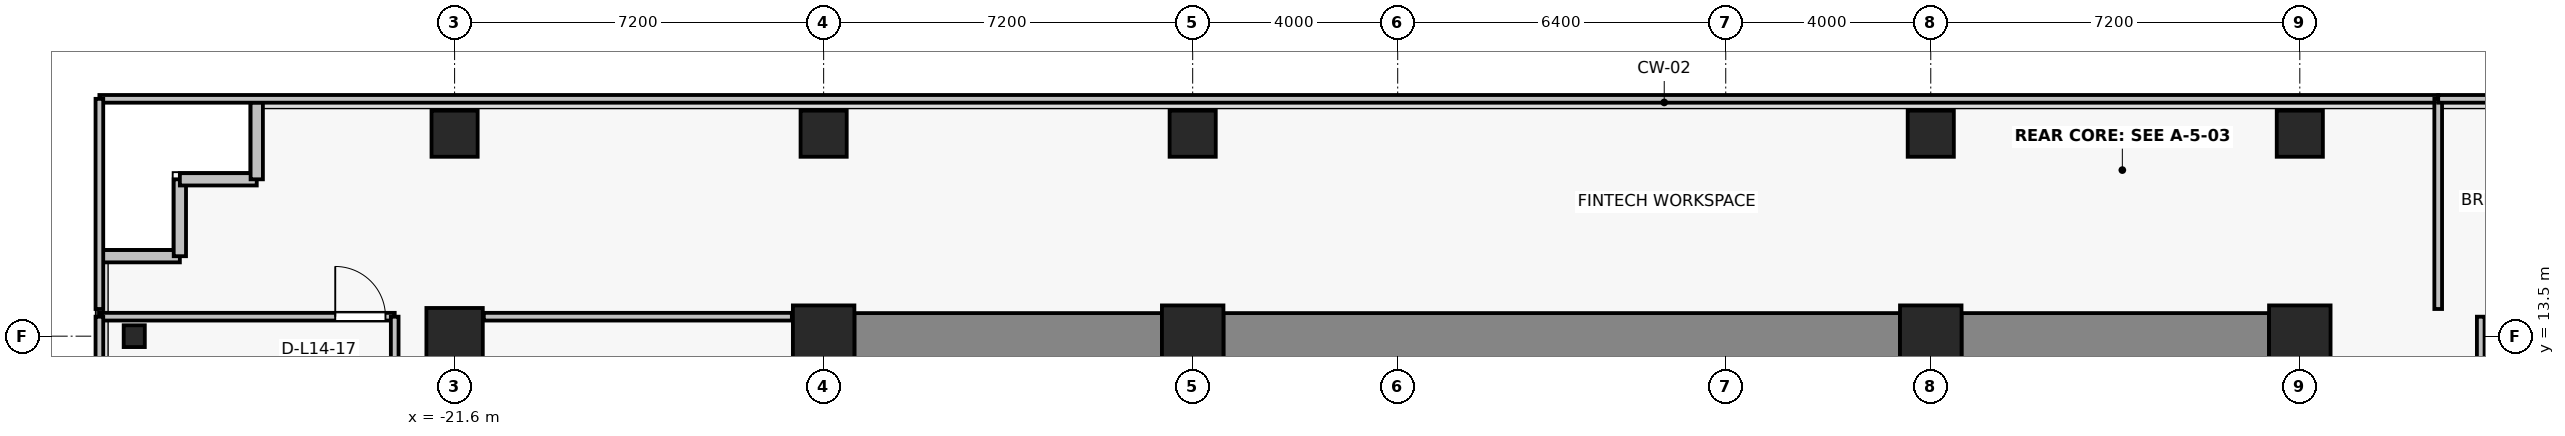
"""IFC4 building model, lengths in metres.
Left out: names, types, materials, properties, quantities, classifications, styles, units other than length and angle.
Written with IfcOpenShell. Run it as: python <this file> out.ifc"""

import sys

from ifc_helpers import new_model, si_unit, direction, frame, frame_2d, origin, origin_2d, place, context, subcontext, project, spatial, rectangle, i_section, extrude, source, transform, mapped, element, fill, save


model = new_model("IFC4")
c1 = context("Model", 3, precision=1e-05, world=origin(), true_north=direction((0.0, 1.0)))
c2 = subcontext(c1, "Body", "Model", "MODEL_VIEW")
j1 = project(units=[si_unit("LENGTHUNIT", "METRE"), si_unit("PLANEANGLEUNIT", "RADIAN")], contexts=[c1])
p1 = place(None, origin())
s1 = spatial("IfcSite", under=j1, at=p1, CompositionType="ELEMENT")
p2 = place(p1, origin())
s2 = spatial("IfcBuilding", under=s1, at=p2, CompositionType="ELEMENT")
p3 = place(p2, frame((0.0, 0.0, 53.8)))
s3 = spatial("IfcBuildingStorey", under=s2, at=p3, CompositionType="ELEMENT", Elevation=53.8)
for number, where, z_axis, x_axis in (
    (1, (-14.4, 13.5, 0.0), (0.0, 0.0, 1.0), (1.0, 0.0, 0.0)),
    (2, (-7.2, 13.5, 0.0), (0.0, 0.0, 1.0), (1.0, 0.0, 0.0)),
    (3, (7.2, 13.5, 0.0), (0.0, 0.0, 1.0), (1.0, 0.0, 0.0)),
    (4, (14.4, 13.5, 0.0), (0.0, 0.0, 1.0), (1.0, 0.0, 0.0)),
):
    element("IfcColumn", number, at=place(p3, frame(where, z_axis=z_axis, x_axis=x_axis)), inside=s3, PredefinedType="COLUMN", context=c2, shape_type="SweptSolid", body=[
        extrude(rectangle(XDim=1.2, YDim=1.2, at=origin_2d()), origin(), (0.0, 0.0, 1.0), 3.3),
    ])
p4 = place(p3, frame((-21.6, 13.5, 0.0), z_axis=(0.0, 0.0, 1.0), x_axis=(1.0, 0.0, 0.0)))
e5 = element("IfcColumn", 5, at=p4, inside=s3, PredefinedType="COLUMN", context=c2, shape_type="SweptSolid", body=[
    extrude(rectangle(XDim=1.1, YDim=1.1, at=origin_2d()), origin(), (0.0, 0.0, 1.0), 3.3),
])
for number, where, z_axis, x_axis in (
    (6, (-14.4, 17.45, 0.0), (0.0, 0.0, 1.0), (1.0, 0.0, 0.0)),
    (7, (-7.2, 17.45, 0.0), (0.0, 0.0, 1.0), (1.0, 0.0, 0.0)),
    (8, (7.2, 17.45, 0.0), (0.0, 0.0, 1.0), (1.0, 0.0, 0.0)),
    (9, (14.4, 17.45, 0.0), (0.0, 0.0, 1.0), (1.0, 0.0, 0.0)),
    (10, (-21.6, 17.45, 0.0), (0.0, 0.0, 1.0), (1.0, 0.0, 0.0)),
):
    element("IfcColumn", number, at=place(p3, frame(where, z_axis=z_axis, x_axis=x_axis)), inside=s3, PredefinedType="COLUMN", context=c2, shape_type="SweptSolid", body=[
        extrude(rectangle(XDim=0.9, YDim=0.9, at=origin_2d()), origin(), (0.0, 0.0, 1.0), 3.3),
    ])
p5 = place(p3, frame((-27.85, 13.5, 0.0), z_axis=(0.0, 0.0, 1.0), x_axis=(1.0, 0.0, 0.0)))
e11 = element("IfcColumn", 11, at=p5, inside=s3, PredefinedType="COLUMN", context=c2, shape_type="SweptSolid", body=[
    extrude(i_section(OverallWidth=0.412, OverallDepth=0.425, WebThickness=0.026, FlangeThickness=0.039, FilletRadius=0.015, at=origin_2d()), origin(), (0.0, 0.0, 1.0), 3.3),
])
p6 = place(p3, frame((-13.8, 13.5, 0.0), z_axis=(0.0, 0.0, 1.0), x_axis=(1.0, 0.0, 0.0)))
e12 = element("IfcWall", 12, at=p6, inside=s3, PredefinedType="SHEAR", context=c2, shape_type="SweptSolid", body=[
    extrude(rectangle(XDim=6.0, YDim=0.9, at=frame_2d((3.0, 0.0))), origin(), (0.0, 0.0, 1.0), 3.075),
])
p7 = place(p3, frame((-6.6, 13.5, 0.0), z_axis=(0.0, 0.0, 1.0), x_axis=(1.0, 0.0, 0.0)))
e13 = element("IfcWall", 13, at=p7, inside=s3, PredefinedType="SHEAR", context=c2, shape_type="SweptSolid", body=[
    extrude(rectangle(XDim=13.2, YDim=0.9, at=frame_2d((6.6, 0.0))), origin(), (0.0, 0.0, 1.0), 3.075),
])
p8 = place(p3, frame((7.8, 13.5, 0.0), z_axis=(0.0, 0.0, 1.0), x_axis=(1.0, 0.0, 0.0)))
e14 = element("IfcWall", 14, at=p8, inside=s3, PredefinedType="SHEAR", context=c2, shape_type="SweptSolid", body=[
    extrude(rectangle(XDim=6.0, YDim=0.9, at=frame_2d((3.0, 0.0))), origin(), (0.0, 0.0, 1.0), 3.075),
])
for number, where, z_axis, x_axis in (
    (15, (-26.96, 15.06, 0.0), (0.0, 0.0, 1.0), (-1.0, 0.0, 0.0)),
    (16, (-26.96, 16.56, 0.0), (0.0, 0.0, 1.0), (0.0, -1.0, 0.0)),
    (17, (-25.46, 16.56, 0.0), (0.0, 0.0, 1.0), (-1.0, 0.0, 0.0)),
    (18, (-25.46, 18.06, 0.0), (0.0, 0.0, 1.0), (0.0, -1.0, 0.0)),
):
    element("IfcWall", number, at=place(p3, frame(where, z_axis=z_axis, x_axis=x_axis)), inside=s3, PredefinedType="SOLIDWALL", context=c2, shape_type="SweptSolid", body=[
        extrude(rectangle(XDim=1.5, YDim=0.24, at=frame_2d((0.75, 0.0))), origin(), (0.0, 0.0, 1.0), 3.075),
    ])
p9 = place(p3, frame((-28.53, 13.88, 0.0), z_axis=(0.0, 0.0, 1.0), x_axis=(1.0, 0.0, 0.0)))
e19 = element("IfcWall", 19, at=p9, inside=s3, PredefinedType="PARTITIONING", context=c2, shape_type="SweptSolid", body=[
    extrude(rectangle(XDim=5.761, YDim=0.15, at=frame_2d((2.881, 0.0))), origin(), (0.0, 0.0, 1.0), 3.075),
])
p10 = place(p9, frame((4.602, 0.0, 0.0)))
e20 = element("IfcOpeningElement", 20, at=p10, cuts=e19, PredefinedType="OPENING", context=c2, shape_type="SweptSolid", body=[
    extrude(rectangle(XDim=0.98, YDim=2.15, at=frame_2d((0.49, 1.075))), frame((0.0, 0.085, 0.0), z_axis=(0.0, -1.0, 0.0), x_axis=(1.0, 0.0, 0.0)), (0.0, 0.0, 1.0), 0.17),
])
p11 = place(p3, frame((-28.53, -1.77, 0.0), z_axis=(0.0, 0.0, 1.0), x_axis=(0.0, 1.0, 0.0)))
e21 = element("IfcWall", 21, at=p11, inside=s3, PredefinedType="PARTITIONING", context=c2, shape_type="SweptSolid", body=[
    extrude(rectangle(XDim=15.65, YDim=0.15, at=frame_2d((7.825, 0.0))), origin(), (0.0, 0.0, 1.0), 3.075),
])
p12 = place(p3, frame((-22.769, 13.88, 0.0), z_axis=(0.0, 0.0, 1.0), x_axis=(0.0, -1.0, 0.0)))
e22 = element("IfcWall", 22, at=p12, inside=s3, PredefinedType="PARTITIONING", context=c2, shape_type="SweptSolid", body=[
    extrude(rectangle(XDim=15.65, YDim=0.15, at=frame_2d((7.825, 0.0))), origin(), (0.0, 0.0, 1.0), 2.465),
])
p13 = place(p3, frame((-21.03, 13.88, 0.0), z_axis=(0.0, 0.0, 1.0), x_axis=(1.0, 0.0, 0.0)))
e23 = element("IfcWall", 23, at=p13, inside=s3, PredefinedType="PARTITIONING", context=c2, shape_type="SweptSolid", body=[
    extrude(rectangle(XDim=6.01, YDim=0.15, at=frame_2d((3.005, 0.0))), origin(), (0.0, 0.0, 1.0), 3.075),
])
p14 = place(p3, frame((17.93, -1.77, 0.0), z_axis=(0.0, 0.0, 1.0), x_axis=(0.0, 1.0, 0.0)))
e24 = element("IfcWall", 24, at=p14, inside=s3, PredefinedType="PARTITIONING", context=c2, shape_type="SweptSolid", body=[
    extrude(rectangle(XDim=15.65, YDim=0.15, at=frame_2d((7.825, 0.0))), origin(), (0.0, 0.0, 1.0), 2.465),
])
p15 = place(p14, frame((7.335, 0.0, 0.0)))
e25 = element("IfcOpeningElement", 25, at=p15, cuts=e24, PredefinedType="OPENING", context=c2, shape_type="SweptSolid", body=[
    extrude(rectangle(XDim=0.98, YDim=2.15, at=frame_2d((0.49, 1.075))), frame((0.0, 0.085, 0.0), z_axis=(0.0, -1.0, 0.0), x_axis=(1.0, 0.0, 0.0)), (0.0, 0.0, 1.0), 0.17),
])
p16 = place(p3, frame((-28.53, 18.13, 0.0), z_axis=(0.0, 0.0, 1.0), x_axis=(1.0, 0.0, 0.0)))
e26 = element("IfcWall", 26, at=p16, inside=s3, PredefinedType="PARTITIONING", context=c2, shape_type="SweptSolid", body=[
    extrude(rectangle(XDim=45.63, YDim=0.15, at=frame_2d((22.815, 0.0))), origin(), (0.0, 0.0, 1.0), 3.075),
])
p17 = place(p3, frame((-28.53, 14.03, 0.0), z_axis=(0.0, 0.0, 1.0), x_axis=(0.0, 1.0, 0.0)))
e27 = element("IfcWall", 27, at=p17, inside=s3, PredefinedType="PARTITIONING", context=c2, shape_type="SweptSolid", body=[
    extrude(rectangle(XDim=4.1, YDim=0.15, at=frame_2d((2.05, 0.0))), origin(), (0.0, 0.0, 1.0), 3.075),
])
p18 = place(p3, frame((17.1, 18.13, 0.0), z_axis=(0.0, 0.0, 1.0), x_axis=(0.0, -1.0, 0.0)))
e28 = element("IfcWall", 28, at=p18, inside=s3, PredefinedType="PARTITIONING", context=c2, shape_type="SweptSolid", body=[
    extrude(rectangle(XDim=4.1, YDim=0.15, at=frame_2d((2.05, 0.0))), origin(), (0.0, 0.0, 1.0), 2.465),
])
p19 = place(p3, frame((17.1, 18.13, 0.0), z_axis=(0.0, 0.0, 1.0), x_axis=(1.0, 0.0, 0.0)))
e29 = element("IfcWall", 29, at=p19, inside=s3, PredefinedType="PARTITIONING", context=c2, shape_type="SweptSolid", body=[
    extrude(rectangle(XDim=15.43, YDim=0.15, at=frame_2d((7.715, 0.0))), origin(), (0.0, 0.0, 1.0), 3.075),
])
m1 = source(origin(), c2, "Body", "SweptSolid", [
    extrude(rectangle(XDim=0.98, YDim=2.15, at=frame_2d((0.49, 1.075))), frame((0.0, 0.025, 0.0), z_axis=(0.0, -1.0, 0.0), x_axis=(1.0, 0.0, 0.0)), (0.0, 0.0, 1.0), 0.05),
])
p20 = place(p10, origin())
e30 = element("IfcDoor", 30, at=p20, inside=s3, OperationType="SINGLE_SWING_LEFT", PredefinedType="DOOR", context=c2, shape_type="MappedRepresentation", body=[
    mapped(m1, transform((0.0, 0.0, 0.0), x_axis=(1.0, 0.0, 0.0), y_axis=(0.0, 1.0, 0.0), z_axis=(0.0, 0.0, 1.0), scale=1.0)),
])
fill(e20, e30)
save(model, sys.argv[1])
